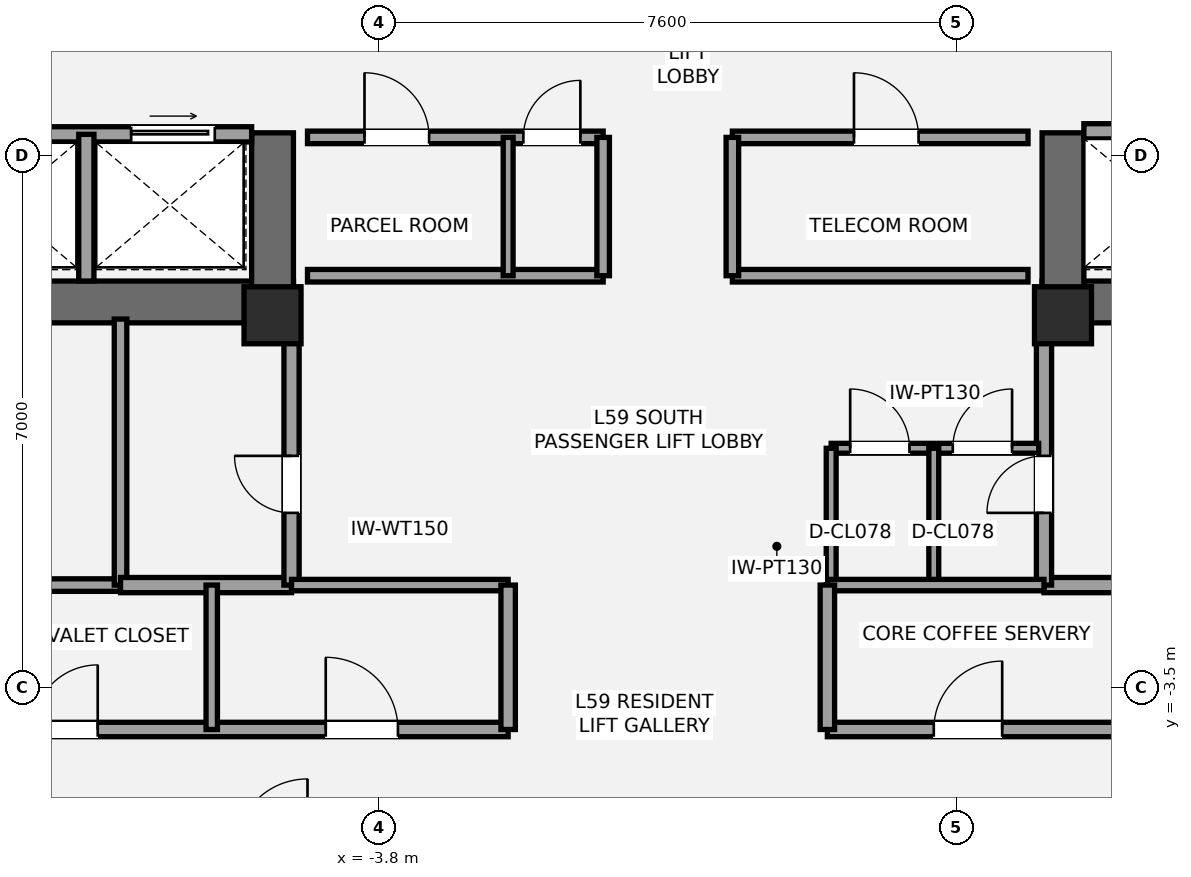
"""IFC4 building model, lengths in metres.
Left out: names, types, materials, properties, quantities, classifications, styles, units other than length and angle.
Written with IfcOpenShell. Run it as: python <this file> out.ifc"""

import sys

from ifc_helpers import new_model, si_unit, direction, frame, frame_2d, origin, origin_2d, place, context, subcontext, project, spatial, rectangle, extrude, element, fill, save


model = new_model("IFC4")
c1 = context("Model", 3, precision=1e-05, world=origin(), true_north=direction((0.0, 1.0)))
c2 = subcontext(c1, "Body", "Model", "MODEL_VIEW")
j1 = project(units=[si_unit("LENGTHUNIT", "METRE"), si_unit("PLANEANGLEUNIT", "RADIAN")], contexts=[c1])
p1 = place(None, origin())
s1 = spatial("IfcSite", under=j1, at=p1, CompositionType="ELEMENT")
p2 = place(p1, origin())
s2 = spatial("IfcBuilding", under=s1, at=p2, CompositionType="ELEMENT")
p3 = place(p2, frame((0.0, 0.0, 213.15)))
s3 = spatial("IfcBuildingStorey", under=s2, at=p3, CompositionType="ELEMENT", Elevation=213.15)
p4 = place(p3, frame((-4.925, 1.575, 0.0), z_axis=(0.0, 0.0, 1.0), x_axis=(-1.0, 0.0, 0.0)))
e1 = element("IfcWall", 1, at=p4, inside=s3, PredefinedType="SHEAR", context=c2, shape_type="SweptSolid", body=[
    extrude(rectangle(XDim=8.775, YDim=0.55, at=frame_2d((4.387, 0.0))), origin(), (0.0, 0.0, 1.0), 3.15),
])
p5 = place(p4, frame((5.375, 0.0, 0.0)))
e2 = element("IfcOpeningElement", 2, at=p5, cuts=e1, PredefinedType="OPENING", context=c2, shape_type="SweptSolid", body=[
    extrude(rectangle(XDim=1.05, YDim=2.15, at=frame_2d((0.525, 1.075))), frame((0.0, 0.285, 0.0), z_axis=(0.0, -1.0, 0.0), x_axis=(1.0, 0.0, 0.0)), (0.0, 0.0, 1.0), 0.57),
])
p6 = place(p4, frame((3.705, 0.0, 0.0)))
e3 = element("IfcOpeningElement", 3, at=p6, cuts=e1, PredefinedType="OPENING", context=c2, shape_type="SweptSolid", body=[
    extrude(rectangle(XDim=1.1, YDim=2.2, at=frame_2d((0.55, 1.1))), frame((0.0, 0.285, 0.0), z_axis=(0.0, -1.0, 0.0), x_axis=(1.0, 0.0, 0.0)), (0.0, 0.0, 1.0), 0.57),
])
p7 = place(p3, frame((-5.2, 1.3, 0.0), z_axis=(0.0, 0.0, 1.0), x_axis=(0.0, 1.0, 0.0)))
e4 = element("IfcWall", 4, at=p7, inside=s3, PredefinedType="SHEAR", context=c2, shape_type="SweptSolid", body=[
    extrude(rectangle(XDim=2.5, YDim=0.55, at=frame_2d((1.25, 0.0))), origin(), (0.0, 0.0, 1.0), 3.15),
])
p8 = place(p3, frame((13.7, 1.575, 0.0), z_axis=(0.0, 0.0, 1.0), x_axis=(-1.0, 0.0, 0.0)))
e5 = element("IfcWall", 5, at=p8, inside=s3, PredefinedType="SHEAR", context=c2, shape_type="SweptSolid", body=[
    extrude(rectangle(XDim=8.775, YDim=0.55, at=frame_2d((4.387, 0.0))), origin(), (0.0, 0.0, 1.0), 3.15),
])
p9 = place(p8, frame((2.35, 0.0, 0.0)))
e6 = element("IfcOpeningElement", 6, at=p9, cuts=e5, PredefinedType="OPENING", context=c2, shape_type="SweptSolid", body=[
    extrude(rectangle(XDim=1.05, YDim=2.15, at=frame_2d((0.525, 1.075))), frame((0.0, 0.285, 0.0), z_axis=(0.0, -1.0, 0.0), x_axis=(1.0, 0.0, 0.0)), (0.0, 0.0, 1.0), 0.57),
])
p10 = place(p8, frame((4.35, 0.0, 0.0)))
e7 = element("IfcOpeningElement", 7, at=p10, cuts=e5, PredefinedType="OPENING", context=c2, shape_type="SweptSolid", body=[
    extrude(rectangle(XDim=1.1, YDim=2.2, at=frame_2d((0.55, 1.1))), frame((0.0, 0.285, 0.0), z_axis=(0.0, -1.0, 0.0), x_axis=(1.0, 0.0, 0.0)), (0.0, 0.0, 1.0), 0.57),
])
p11 = place(p3, frame((5.2, 1.3, 0.0), z_axis=(0.0, 0.0, 1.0), x_axis=(0.0, 1.0, 0.0)))
e8 = element("IfcWall", 8, at=p11, inside=s3, PredefinedType="SHEAR", context=c2, shape_type="SweptSolid", body=[
    extrude(rectangle(XDim=2.5, YDim=0.55, at=frame_2d((1.25, 0.0))), origin(), (0.0, 0.0, 1.0), 3.15),
])
for number, where, z_axis, x_axis in (
    (9, (-5.2, 1.4, 0.0), (0.0, 0.0, 1.0), (1.0, 0.0, 0.0)),
    (10, (5.2, 1.4, 0.0), (0.0, 0.0, 1.0), (1.0, 0.0, 0.0)),
):
    element("IfcColumn", number, at=place(p3, frame(where, z_axis=z_axis, x_axis=x_axis)), inside=s3, PredefinedType="PILASTER", context=c2, shape_type="SweptSolid", body=[
        extrude(rectangle(XDim=0.75, YDim=0.75, at=origin_2d()), origin(), (0.0, 0.0, 1.0), 3.15),
    ])
p12 = place(p3, frame((-13.45, -2.15, 0.0), z_axis=(0.0, 0.0, 1.0), x_axis=(1.0, 0.0, 0.0)))
e11 = element("IfcWall", 11, at=p12, inside=s3, PredefinedType="PARTITIONING", context=c2, shape_type="SweptSolid", body=[
    extrude(rectangle(XDim=6.25, YDim=0.165, at=frame_2d((3.125, 0.0))), origin(), (0.0, 0.0, 1.0), 2.423),
])
p13 = place(p3, frame((-7.2, -2.15, 0.0), z_axis=(0.0, 0.0, 1.0), x_axis=(0.0, 1.0, 0.0)))
e12 = element("IfcWall", 12, at=p13, inside=s3, PredefinedType="PARTITIONING", context=c2, shape_type="SweptSolid", body=[
    extrude(rectangle(XDim=3.5, YDim=0.165, at=frame_2d((1.75, 0.0))), origin(), (0.0, 0.0, 1.0), 2.423),
])
p14 = place(p3, frame((-7.2, -2.15, 0.0), z_axis=(0.0, 0.0, 1.0), x_axis=(1.0, 0.0, 0.0)))
e13 = element("IfcWall", 13, at=p14, inside=s3, PredefinedType="SOLIDWALL", context=c2, shape_type="SweptSolid", body=[
    extrude(rectangle(XDim=2.25, YDim=0.2, at=frame_2d((1.125, 0.0))), origin(), (0.0, 0.0, 1.0), 2.423),
])
p15 = place(p3, frame((-4.95, -2.15, 0.0), z_axis=(0.0, 0.0, 1.0), x_axis=(0.0, 1.0, 0.0)))
e14 = element("IfcWall", 14, at=p15, inside=s3, PredefinedType="SOLIDWALL", context=c2, shape_type="SweptSolid", body=[
    extrude(rectangle(XDim=3.5, YDim=0.2, at=frame_2d((1.75, 0.0))), origin(), (0.0, 0.0, 1.0), 2.423),
])
p16 = place(p15, frame((0.95, 0.0, 0.0)))
e15 = element("IfcOpeningElement", 15, at=p16, cuts=e14, PredefinedType="OPENING", context=c2, shape_type="SweptSolid", body=[
    extrude(rectangle(XDim=0.75, YDim=2.1, at=frame_2d((0.375, 1.05))), frame((0.0, 0.11, 0.0), z_axis=(0.0, -1.0, 0.0), x_axis=(1.0, 0.0, 0.0)), (0.0, 0.0, 1.0), 0.22),
])
p17 = place(p3, frame((4.95, -2.15, 0.0), z_axis=(0.0, 0.0, 1.0), x_axis=(1.0, 0.0, 0.0)))
e16 = element("IfcWall", 16, at=p17, inside=s3, PredefinedType="SOLIDWALL", context=c2, shape_type="SweptSolid", body=[
    extrude(rectangle(XDim=2.25, YDim=0.2, at=frame_2d((1.125, 0.0))), origin(), (0.0, 0.0, 1.0), 2.97),
])
p18 = place(p3, frame((4.95, -2.15, 0.0), z_axis=(0.0, 0.0, 1.0), x_axis=(0.0, 1.0, 0.0)))
e17 = element("IfcWall", 17, at=p18, inside=s3, PredefinedType="SOLIDWALL", context=c2, shape_type="SweptSolid", body=[
    extrude(rectangle(XDim=3.5, YDim=0.2, at=frame_2d((1.75, 0.0))), origin(), (0.0, 0.0, 1.0), 2.423),
])
p19 = place(p18, frame((0.95, 0.0, 0.0)))
e18 = element("IfcOpeningElement", 18, at=p19, cuts=e17, PredefinedType="OPENING", context=c2, shape_type="SweptSolid", body=[
    extrude(rectangle(XDim=0.75, YDim=2.1, at=frame_2d((0.375, 1.05))), frame((0.0, 0.11, 0.0), z_axis=(0.0, -1.0, 0.0), x_axis=(1.0, 0.0, 0.0)), (0.0, 0.0, 1.0), 0.22),
])
p20 = place(p3, frame((2.15, -0.35, 0.0), z_axis=(0.0, 0.0, 1.0), x_axis=(1.0, 0.0, 0.0)))
e19 = element("IfcWall", 19, at=p20, inside=s3, PredefinedType="PARTITIONING", context=c2, shape_type="SweptSolid", body=[
    extrude(rectangle(XDim=2.73, YDim=0.13, at=frame_2d((1.365, 0.0))), origin(), (0.0, 0.0, 1.0), 2.97),
])
p21 = place(p20, frame((0.25, 0.0, 0.0)))
e20 = element("IfcOpeningElement", 20, at=p21, cuts=e19, PredefinedType="OPENING", context=c2, shape_type="SweptSolid", body=[
    extrude(rectangle(XDim=0.78, YDim=2.1, at=frame_2d((0.39, 1.05))), frame((0.0, 0.075, 0.0), z_axis=(0.0, -1.0, 0.0), x_axis=(1.0, 0.0, 0.0)), (0.0, 0.0, 1.0), 0.15),
])
p22 = place(p20, frame((1.6, 0.0, 0.0)))
e21 = element("IfcOpeningElement", 21, at=p22, cuts=e19, PredefinedType="OPENING", context=c2, shape_type="SweptSolid", body=[
    extrude(rectangle(XDim=0.78, YDim=2.1, at=frame_2d((0.39, 1.05))), frame((0.0, 0.075, 0.0), z_axis=(0.0, -1.0, 0.0), x_axis=(1.0, 0.0, 0.0)), (0.0, 0.0, 1.0), 0.15),
])
for number, where, z_axis, x_axis in (
    (22, (2.15, -2.15, 0.0), (0.0, 0.0, 1.0), (0.0, 1.0, 0.0)),
    (23, (3.5, -2.15, 0.0), (0.0, 0.0, 1.0), (0.0, 1.0, 0.0)),
):
    element("IfcWall", number, at=place(p3, frame(where, z_axis=z_axis, x_axis=x_axis)), inside=s3, PredefinedType="PARTITIONING", context=c2, shape_type="SweptSolid", body=[
        extrude(rectangle(XDim=1.8, YDim=0.13, at=frame_2d((0.9, 0.0))), origin(), (0.0, 0.0, 1.0), 2.97),
    ])
p23 = place(p3, frame((-9.78, 3.78, 0.0), z_axis=(0.0, 0.0, 1.0), x_axis=(1.0, 0.0, 0.0)))
e24 = element("IfcWall", 24, at=p23, inside=s3, PredefinedType="SOLIDWALL", context=c2, shape_type="SweptSolid", body=[
    extrude(rectangle(XDim=4.305, YDim=0.2, at=frame_2d((2.152, 0.0))), origin(), (0.0, 0.0, 1.0), 2.97),
])
p24 = place(p23, frame((2.72, 0.0, 0.0)))
e25 = element("IfcOpeningElement", 25, at=p24, cuts=e24, PredefinedType="OPENING", context=c2, shape_type="SweptSolid", body=[
    extrude(rectangle(XDim=1.1, YDim=2.2, at=frame_2d((0.55, 1.1))), frame((0.0, 0.11, 0.0), z_axis=(0.0, -1.0, 0.0), x_axis=(1.0, 0.0, 0.0)), (0.0, 0.0, 1.0), 0.22),
])
p25 = place(p3, frame((-7.65, 1.85, 0.0), z_axis=(0.0, 0.0, 1.0), x_axis=(0.0, 1.0, 0.0)))
e26 = element("IfcWall", 26, at=p25, inside=s3, PredefinedType="SOLIDWALL", context=c2, shape_type="SweptSolid", body=[
    extrude(rectangle(XDim=1.93, YDim=0.2, at=frame_2d((0.965, 0.0))), origin(), (0.0, 0.0, 1.0), 2.97),
])
p26 = place(p3, frame((5.475, 3.82, 0.0), z_axis=(0.0, 0.0, 1.0), x_axis=(1.0, 0.0, 0.0)))
e27 = element("IfcWall", 27, at=p26, inside=s3, PredefinedType="SOLIDWALL", context=c2, shape_type="SweptSolid", body=[
    extrude(rectangle(XDim=4.305, YDim=0.2, at=frame_2d((2.152, 0.0))), origin(), (0.0, 0.0, 1.0), 2.97),
])
p27 = place(p26, frame((0.65, 0.0, 0.0)))
e28 = element("IfcOpeningElement", 28, at=p27, cuts=e27, PredefinedType="OPENING", context=c2, shape_type="SweptSolid", body=[
    extrude(rectangle(XDim=1.2, YDim=2.2, at=frame_2d((0.6, 1.1))), frame((0.0, 0.11, 0.0), z_axis=(0.0, -1.0, 0.0), x_axis=(1.0, 0.0, 0.0)), (0.0, 0.0, 1.0), 0.22),
])
p28 = place(p3, frame((-4.74, 1.92, 0.0), z_axis=(0.0, 0.0, 1.0), x_axis=(1.0, 0.0, 0.0)))
e29 = element("IfcWall", 29, at=p28, inside=s3, PredefinedType="PARTITIONING", context=c2, shape_type="SweptSolid", body=[
    extrude(rectangle(XDim=3.89, YDim=0.165, at=frame_2d((1.945, 0.0))), origin(), (0.0, 0.0, 1.0), 2.11),
])
p29 = place(p3, frame((-4.74, 3.74, 0.0), z_axis=(0.0, 0.0, 1.0), x_axis=(1.0, 0.0, 0.0)))
e30 = element("IfcWall", 30, at=p29, inside=s3, PredefinedType="PARTITIONING", context=c2, shape_type="SweptSolid", body=[
    extrude(rectangle(XDim=3.89, YDim=0.165, at=frame_2d((1.945, 0.0))), origin(), (0.0, 0.0, 1.0), 2.97),
])
p30 = place(p29, frame((0.75, 0.0, 0.0)))
e31 = element("IfcOpeningElement", 31, at=p30, cuts=e30, PredefinedType="OPENING", context=c2, shape_type="SweptSolid", body=[
    extrude(rectangle(XDim=0.85, YDim=2.1, at=frame_2d((0.425, 1.05))), frame((0.0, 0.093, 0.0), z_axis=(0.0, -1.0, 0.0), x_axis=(1.0, 0.0, 0.0)), (0.0, 0.0, 1.0), 0.185),
])
p31 = place(p29, frame((2.84, 0.0, 0.0)))
e32 = element("IfcOpeningElement", 32, at=p31, cuts=e30, PredefinedType="OPENING", context=c2, shape_type="SweptSolid", body=[
    extrude(rectangle(XDim=0.75, YDim=2.1, at=frame_2d((0.375, 1.05))), frame((0.0, 0.093, 0.0), z_axis=(0.0, -1.0, 0.0), x_axis=(1.0, 0.0, 0.0)), (0.0, 0.0, 1.0), 0.185),
])
p32 = place(p3, frame((-0.85, 1.92, 0.0), z_axis=(0.0, 0.0, 1.0), x_axis=(0.0, 1.0, 0.0)))
e33 = element("IfcWall", 33, at=p32, inside=s3, PredefinedType="PARTITIONING", context=c2, shape_type="SweptSolid", body=[
    extrude(rectangle(XDim=1.82, YDim=0.165, at=frame_2d((0.91, 0.0))), origin(), (0.0, 0.0, 1.0), 2.97),
])
p33 = place(p3, frame((0.85, 1.92, 0.0), z_axis=(0.0, 0.0, 1.0), x_axis=(1.0, 0.0, 0.0)))
e34 = element("IfcWall", 34, at=p33, inside=s3, PredefinedType="PARTITIONING", context=c2, shape_type="SweptSolid", body=[
    extrude(rectangle(XDim=3.89, YDim=0.165, at=frame_2d((1.945, 0.0))), origin(), (0.0, 0.0, 1.0), 2.11),
])
p34 = place(p3, frame((0.85, 3.74, 0.0), z_axis=(0.0, 0.0, 1.0), x_axis=(1.0, 0.0, 0.0)))
e35 = element("IfcWall", 35, at=p34, inside=s3, PredefinedType="PARTITIONING", context=c2, shape_type="SweptSolid", body=[
    extrude(rectangle(XDim=3.89, YDim=0.165, at=frame_2d((1.945, 0.0))), origin(), (0.0, 0.0, 1.0), 2.97),
])
p35 = place(p34, frame((1.6, 0.0, 0.0)))
e36 = element("IfcOpeningElement", 36, at=p35, cuts=e35, PredefinedType="OPENING", context=c2, shape_type="SweptSolid", body=[
    extrude(rectangle(XDim=0.85, YDim=2.1, at=frame_2d((0.425, 1.05))), frame((0.0, 0.093, 0.0), z_axis=(0.0, -1.0, 0.0), x_axis=(1.0, 0.0, 0.0)), (0.0, 0.0, 1.0), 0.185),
])
p36 = place(p3, frame((0.85, 1.92, 0.0), z_axis=(0.0, 0.0, 1.0), x_axis=(0.0, 1.0, 0.0)))
e37 = element("IfcWall", 37, at=p36, inside=s3, PredefinedType="PARTITIONING", context=c2, shape_type="SweptSolid", body=[
    extrude(rectangle(XDim=1.82, YDim=0.165, at=frame_2d((0.91, 0.0))), origin(), (0.0, 0.0, 1.0), 2.97),
])
p37 = place(p3, frame((-2.1, 1.92, 0.0), z_axis=(0.0, 0.0, 1.0), x_axis=(0.0, 1.0, 0.0)))
e38 = element("IfcWall", 38, at=p37, inside=s3, PredefinedType="PARTITIONING", context=c2, shape_type="SweptSolid", body=[
    extrude(rectangle(XDim=1.82, YDim=0.13, at=frame_2d((0.91, 0.0))), origin(), (0.0, 0.0, 1.0), 2.97),
])
p38 = place(p3, frame((-13.45, -4.05, 0.0), z_axis=(0.0, 0.0, 1.0), x_axis=(1.0, 0.0, 0.0)))
e39 = element("IfcWall", 39, at=p38, inside=s3, PredefinedType="PLUMBINGWALL", context=c2, shape_type="SweptSolid", body=[
    extrude(rectangle(XDim=11.35, YDim=0.19, at=frame_2d((5.675, 0.0))), origin(), (0.0, 0.0, 1.0), 2.357),
])
p39 = place(p38, frame((1.25, 0.0, 0.0)))
e40 = element("IfcOpeningElement", 40, at=p39, cuts=e39, PredefinedType="OPENING", context=c2, shape_type="SweptSolid", body=[
    extrude(rectangle(XDim=0.85, YDim=2.1, at=frame_2d((0.425, 1.05))), frame((0.0, 0.105, 0.0), z_axis=(0.0, -1.0, 0.0), x_axis=(1.0, 0.0, 0.0)), (0.0, 0.0, 1.0), 0.21),
])
p40 = place(p38, frame((5.1, 0.0, 0.0)))
e41 = element("IfcOpeningElement", 41, at=p40, cuts=e39, PredefinedType="OPENING", context=c2, shape_type="SweptSolid", body=[
    extrude(rectangle(XDim=0.85, YDim=2.1, at=frame_2d((0.425, 1.05))), frame((0.0, 0.105, 0.0), z_axis=(0.0, -1.0, 0.0), x_axis=(1.0, 0.0, 0.0)), (0.0, 0.0, 1.0), 0.21),
])
p41 = place(p38, frame((8.95, 0.0, 0.0)))
e42 = element("IfcOpeningElement", 42, at=p41, cuts=e39, PredefinedType="OPENING", context=c2, shape_type="SweptSolid", body=[
    extrude(rectangle(XDim=0.95, YDim=2.15, at=frame_2d((0.475, 1.075))), frame((0.0, 0.105, 0.0), z_axis=(0.0, -1.0, 0.0), x_axis=(1.0, 0.0, 0.0)), (0.0, 0.0, 1.0), 0.21),
])
p42 = place(p3, frame((-4.95, -2.15, 0.0), z_axis=(0.0, 0.0, 1.0), x_axis=(1.0, 0.0, 0.0)))
e43 = element("IfcWall", 43, at=p42, inside=s3, PredefinedType="PLUMBINGWALL", context=c2, shape_type="SweptSolid", body=[
    extrude(rectangle(XDim=2.85, YDim=0.15, at=frame_2d((1.425, 0.0))), origin(), (0.0, 0.0, 1.0), 2.97),
])
p43 = place(p3, frame((-2.1, -4.05, 0.0), z_axis=(0.0, 0.0, 1.0), x_axis=(0.0, 1.0, 0.0)))
e44 = element("IfcWall", 44, at=p43, inside=s3, PredefinedType="PLUMBINGWALL", context=c2, shape_type="SweptSolid", body=[
    extrude(rectangle(XDim=1.9, YDim=0.19, at=frame_2d((0.95, 0.0))), origin(), (0.0, 0.0, 1.0), 2.423),
])
p44 = place(p3, frame((-6.0, -4.05, 0.0), z_axis=(0.0, 0.0, 1.0), x_axis=(0.0, 1.0, 0.0)))
e45 = element("IfcWall", 45, at=p44, inside=s3, PredefinedType="PLUMBINGWALL", context=c2, shape_type="SweptSolid", body=[
    extrude(rectangle(XDim=1.9, YDim=0.15, at=frame_2d((0.95, 0.0))), origin(), (0.0, 0.0, 1.0), 2.423),
])
p45 = place(p3, frame((2.1, -4.05, 0.0), z_axis=(0.0, 0.0, 1.0), x_axis=(1.0, 0.0, 0.0)))
e46 = element("IfcWall", 46, at=p45, inside=s3, PredefinedType="PLUMBINGWALL", context=c2, shape_type="SweptSolid", body=[
    extrude(rectangle(XDim=11.35, YDim=0.19, at=frame_2d((5.675, 0.0))), origin(), (0.0, 0.0, 1.0), 2.357),
])
p46 = place(p45, frame((1.4, 0.0, 0.0)))
e47 = element("IfcOpeningElement", 47, at=p46, cuts=e46, PredefinedType="OPENING", context=c2, shape_type="SweptSolid", body=[
    extrude(rectangle(XDim=0.9, YDim=2.1, at=frame_2d((0.45, 1.05))), frame((0.0, 0.105, 0.0), z_axis=(0.0, -1.0, 0.0), x_axis=(1.0, 0.0, 0.0)), (0.0, 0.0, 1.0), 0.21),
])
p47 = place(p45, frame((5.3, 0.0, 0.0)))
e48 = element("IfcOpeningElement", 48, at=p47, cuts=e46, PredefinedType="OPENING", context=c2, shape_type="SweptSolid", body=[
    extrude(rectangle(XDim=0.9, YDim=2.1, at=frame_2d((0.45, 1.05))), frame((0.0, 0.105, 0.0), z_axis=(0.0, -1.0, 0.0), x_axis=(1.0, 0.0, 0.0)), (0.0, 0.0, 1.0), 0.21),
])
p48 = place(p45, frame((9.1, 0.0, 0.0)))
e49 = element("IfcOpeningElement", 49, at=p48, cuts=e46, PredefinedType="OPENING", context=c2, shape_type="SweptSolid", body=[
    extrude(rectangle(XDim=0.9, YDim=2.1, at=frame_2d((0.45, 1.05))), frame((0.0, 0.105, 0.0), z_axis=(0.0, -1.0, 0.0), x_axis=(1.0, 0.0, 0.0)), (0.0, 0.0, 1.0), 0.21),
])
p49 = place(p3, frame((2.1, -2.15, 0.0), z_axis=(0.0, 0.0, 1.0), x_axis=(1.0, 0.0, 0.0)))
e50 = element("IfcWall", 50, at=p49, inside=s3, PredefinedType="PLUMBINGWALL", context=c2, shape_type="SweptSolid", body=[
    extrude(rectangle(XDim=2.85, YDim=0.15, at=frame_2d((1.425, 0.0))), origin(), (0.0, 0.0, 1.0), 2.97),
])
p50 = place(p3, frame((2.1, -4.05, 0.0), z_axis=(0.0, 0.0, 1.0), x_axis=(0.0, 1.0, 0.0)))
e51 = element("IfcWall", 51, at=p50, inside=s3, PredefinedType="PLUMBINGWALL", context=c2, shape_type="SweptSolid", body=[
    extrude(rectangle(XDim=1.9, YDim=0.19, at=frame_2d((0.95, 0.0))), origin(), (0.0, 0.0, 1.0), 2.97),
])
p51 = place(p16, origin())
e52 = element("IfcDoor", 52, at=p51, inside=s3, OperationType="SINGLE_SWING_RIGHT", PredefinedType="DOOR", context=c2, shape_type="SweptSolid", body=[
    extrude(rectangle(XDim=0.75, YDim=2.1, at=frame_2d((0.375, 1.05))), frame((0.0, 0.025, 0.0), z_axis=(0.0, -1.0, 0.0), x_axis=(1.0, 0.0, 0.0)), (0.0, 0.0, 1.0), 0.05),
])
fill(e15, e52)
p52 = place(p19, origin())
e53 = element("IfcDoor", 53, at=p52, inside=s3, OperationType="SINGLE_SWING_LEFT", PredefinedType="DOOR", context=c2, shape_type="SweptSolid", body=[
    extrude(rectangle(XDim=0.75, YDim=2.1, at=frame_2d((0.375, 1.05))), frame((0.0, 0.025, 0.0), z_axis=(0.0, -1.0, 0.0), x_axis=(1.0, 0.0, 0.0)), (0.0, 0.0, 1.0), 0.05),
])
fill(e18, e53)
p53 = place(p21, origin())
e54 = element("IfcDoor", 54, at=p53, inside=s3, OperationType="SINGLE_SWING_LEFT", PredefinedType="DOOR", context=c2, shape_type="SweptSolid", body=[
    extrude(rectangle(XDim=0.78, YDim=2.1, at=frame_2d((0.39, 1.05))), frame((0.0, 0.025, 0.0), z_axis=(0.0, -1.0, 0.0), x_axis=(1.0, 0.0, 0.0)), (0.0, 0.0, 1.0), 0.05),
])
fill(e20, e54)
p54 = place(p22, origin())
e55 = element("IfcDoor", 55, at=p54, inside=s3, OperationType="SINGLE_SWING_RIGHT", PredefinedType="DOOR", context=c2, shape_type="SweptSolid", body=[
    extrude(rectangle(XDim=0.78, YDim=2.1, at=frame_2d((0.39, 1.05))), frame((0.0, 0.025, 0.0), z_axis=(0.0, -1.0, 0.0), x_axis=(1.0, 0.0, 0.0)), (0.0, 0.0, 1.0), 0.05),
])
fill(e21, e55)
p55 = place(p24, origin())
e56 = element("IfcDoor", 56, at=p55, inside=s3, OperationType="SLIDING_TO_LEFT", PredefinedType="DOOR", context=c2, shape_type="SweptSolid", body=[
    extrude(rectangle(XDim=1.1, YDim=2.2, at=frame_2d((0.55, 1.1))), frame((0.0, 0.025, 0.0), z_axis=(0.0, -1.0, 0.0), x_axis=(1.0, 0.0, 0.0)), (0.0, 0.0, 1.0), 0.05),
])
fill(e25, e56)
p56 = place(p30, origin())
e57 = element("IfcDoor", 57, at=p56, inside=s3, OperationType="SINGLE_SWING_LEFT", PredefinedType="DOOR", context=c2, shape_type="SweptSolid", body=[
    extrude(rectangle(XDim=0.85, YDim=2.1, at=frame_2d((0.425, 1.05))), frame((0.0, 0.025, 0.0), z_axis=(0.0, -1.0, 0.0), x_axis=(1.0, 0.0, 0.0)), (0.0, 0.0, 1.0), 0.05),
])
fill(e31, e57)
p57 = place(p31, origin())
e58 = element("IfcDoor", 58, at=p57, inside=s3, OperationType="SINGLE_SWING_RIGHT", PredefinedType="DOOR", context=c2, shape_type="SweptSolid", body=[
    extrude(rectangle(XDim=0.75, YDim=2.1, at=frame_2d((0.375, 1.05))), frame((0.0, 0.025, 0.0), z_axis=(0.0, -1.0, 0.0), x_axis=(1.0, 0.0, 0.0)), (0.0, 0.0, 1.0), 0.05),
])
fill(e32, e58)
p58 = place(p35, origin())
e59 = element("IfcDoor", 59, at=p58, inside=s3, OperationType="SINGLE_SWING_LEFT", PredefinedType="DOOR", context=c2, shape_type="SweptSolid", body=[
    extrude(rectangle(XDim=0.85, YDim=2.1, at=frame_2d((0.425, 1.05))), frame((0.0, 0.025, 0.0), z_axis=(0.0, -1.0, 0.0), x_axis=(1.0, 0.0, 0.0)), (0.0, 0.0, 1.0), 0.05),
])
fill(e36, e59)
p59 = place(p40, origin())
e60 = element("IfcDoor", 60, at=p59, inside=s3, OperationType="SINGLE_SWING_RIGHT", PredefinedType="DOOR", context=c2, shape_type="SweptSolid", body=[
    extrude(rectangle(XDim=0.85, YDim=2.1, at=frame_2d((0.425, 1.05))), frame((0.0, 0.025, 0.0), z_axis=(0.0, -1.0, 0.0), x_axis=(1.0, 0.0, 0.0)), (0.0, 0.0, 1.0), 0.05),
])
fill(e41, e60)
p60 = place(p41, origin())
e61 = element("IfcDoor", 61, at=p60, inside=s3, OperationType="SINGLE_SWING_LEFT", PredefinedType="DOOR", context=c2, shape_type="SweptSolid", body=[
    extrude(rectangle(XDim=0.95, YDim=2.15, at=frame_2d((0.475, 1.075))), frame((0.0, 0.025, 0.0), z_axis=(0.0, -1.0, 0.0), x_axis=(1.0, 0.0, 0.0)), (0.0, 0.0, 1.0), 0.05),
])
fill(e42, e61)
p61 = place(p46, origin())
e62 = element("IfcDoor", 62, at=p61, inside=s3, OperationType="SINGLE_SWING_RIGHT", PredefinedType="DOOR", context=c2, shape_type="SweptSolid", body=[
    extrude(rectangle(XDim=0.9, YDim=2.1, at=frame_2d((0.45, 1.05))), frame((0.0, 0.025, 0.0), z_axis=(0.0, -1.0, 0.0), x_axis=(1.0, 0.0, 0.0)), (0.0, 0.0, 1.0), 0.05),
])
fill(e47, e62)
save(model, sys.argv[1])
